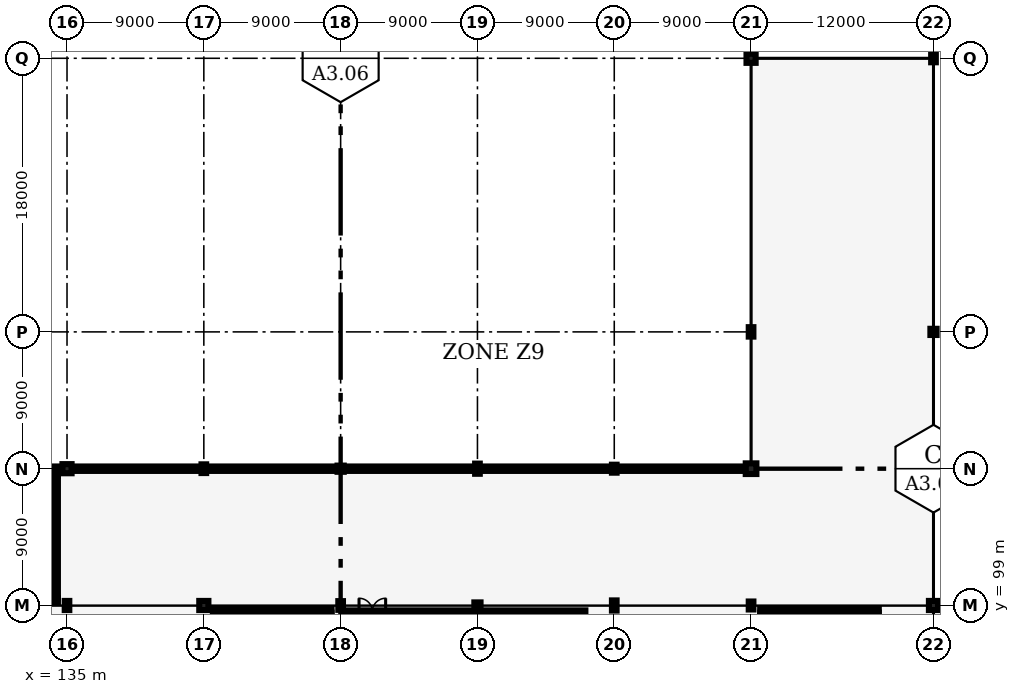
"""IFC4 building model, lengths in metres.
Left out: names, types, materials, properties, quantities, classifications, styles, units other than length and angle.
Written with IfcOpenShell. Run it as: python <this file> out.ifc"""

import sys

from ifc_helpers import new_model, si_unit, direction, frame, frame_2d, origin, origin_2d, place, context, subcontext, project, spatial, rectangle, hollow_circle, i_section, extrude, element, fill, save


model = new_model("IFC4")
c1 = context("Model", 3, precision=1e-05, world=origin(), true_north=direction((0.0, 1.0)))
c2 = subcontext(c1, "Body", "Model", "MODEL_VIEW")
j1 = project(units=[si_unit("LENGTHUNIT", "METRE"), si_unit("PLANEANGLEUNIT", "RADIAN")], contexts=[c1])
p1 = place(None, origin())
s1 = spatial("IfcSite", under=j1, at=p1, CompositionType="ELEMENT")
p2 = place(p1, origin())
s2 = spatial("IfcBuilding", under=s1, at=p2, CompositionType="ELEMENT")
p3 = place(p2, frame((0.0, 0.0, 6.0)))
s3 = spatial("IfcBuildingStorey", under=s2, at=p3, CompositionType="ELEMENT", Elevation=6.0)
p4 = place(p3, frame((135.0, 99.0, 0.0), z_axis=(0.0, 0.0, 1.0), x_axis=(1.0, 0.0, 0.0)))
e1 = element("IfcColumn", 1, at=p4, inside=s3, PredefinedType="COLUMN", context=c2, shape_type="SweptSolid", body=[
    extrude(i_section(OverallWidth=0.3, OverallDepth=0.6, WebThickness=0.015, FlangeThickness=0.03, FilletRadius=0.027, at=origin_2d()), origin(), (0.0, 0.0, 1.0), 6.0),
])
for number, where, z_axis, x_axis in (
    (2, (135.0, 108.0, 0.0), (0.0, 0.0, 1.0), (1.0, 0.0, 0.0)),
    (3, (144.0, 99.0, 0.0), (0.0, 0.0, 1.0), (1.0, 0.0, 0.0)),
):
    element("IfcColumn", number, at=place(p3, frame(where, z_axis=z_axis, x_axis=x_axis)), inside=s3, PredefinedType="COLUMN", context=c2, shape_type="SweptSolid", body=[
        extrude(rectangle(XDim=0.6, YDim=0.6, at=origin_2d()), origin(), (0.0, 0.0, 1.0), 6.0),
    ])
for number, where, z_axis, x_axis in (
    (4, (144.0, 108.0, 0.0), (0.0, 0.0, 1.0), (1.0, 0.0, 0.0)),
    (5, (153.0, 99.0, 0.0), (0.0, 0.0, 1.0), (1.0, 0.0, 0.0)),
):
    element("IfcColumn", number, at=place(p3, frame(where, z_axis=z_axis, x_axis=x_axis)), inside=s3, PredefinedType="COLUMN", context=c2, shape_type="SweptSolid", body=[
        extrude(i_section(OverallWidth=0.306, OverallDepth=0.572, WebThickness=0.021, FlangeThickness=0.04, FilletRadius=0.027, at=origin_2d()), origin(), (0.0, 0.0, 1.0), 6.0),
    ])
for number, where, z_axis, x_axis in (
    (6, (153.0, 108.0, 0.0), (0.0, 0.0, 1.0), (1.0, 0.0, 0.0)),
    (7, (162.0, 99.0, 0.0), (0.0, 0.0, 1.0), (1.0, 0.0, 0.0)),
):
    element("IfcColumn", number, at=place(p3, frame(where, z_axis=z_axis, x_axis=x_axis)), inside=s3, PredefinedType="COLUMN", context=c2, shape_type="SweptSolid", body=[
        extrude(hollow_circle(Radius=0.203, WallThickness=0.016, at=origin_2d()), origin(), (0.0, 0.0, 1.0), 6.0),
    ])
for number, where, z_axis, x_axis in (
    (8, (162.0, 108.0, 0.0), (0.0, 0.0, 1.0), (1.0, 0.0, 0.0)),
    (9, (171.0, 99.0, 0.0), (0.0, 0.0, 1.0), (1.0, 0.0, 0.0)),
):
    element("IfcColumn", number, at=place(p3, frame(where, z_axis=z_axis, x_axis=x_axis)), inside=s3, PredefinedType="COLUMN", context=c2, shape_type="SweptSolid", body=[
        extrude(i_section(OverallWidth=0.305, OverallDepth=0.668, WebThickness=0.021, FlangeThickness=0.04, FilletRadius=0.027, at=origin_2d()), origin(), (0.0, 0.0, 1.0), 6.0),
    ])
for number, where, z_axis, x_axis in (
    (10, (171.0, 108.0, 0.0), (0.0, 0.0, 1.0), (1.0, 0.0, 0.0)),
    (11, (180.0, 99.0, 0.0), (0.0, 0.0, 1.0), (1.0, 0.0, 0.0)),
):
    element("IfcColumn", number, at=place(p3, frame(where, z_axis=z_axis, x_axis=x_axis)), inside=s3, PredefinedType="COLUMN", context=c2, shape_type="SweptSolid", body=[
        extrude(i_section(OverallWidth=0.306, OverallDepth=0.524, WebThickness=0.021, FlangeThickness=0.04, FilletRadius=0.027, at=origin_2d()), origin(), (0.0, 0.0, 1.0), 6.0),
    ])
p5 = place(p3, frame((180.0, 108.0, 0.0), z_axis=(0.0, 0.0, 1.0), x_axis=(1.0, 0.0, 0.0)))
e12 = element("IfcColumn", 12, at=p5, inside=s3, PredefinedType="COLUMN", context=c2, shape_type="SweptSolid", body=[
    extrude(rectangle(XDim=0.7, YDim=0.7, at=origin_2d()), origin(), (0.0, 0.0, 1.0), 6.0),
])
p6 = place(p3, frame((180.0, 117.0, 0.0), z_axis=(0.0, 0.0, 1.0), x_axis=(1.0, 0.0, 0.0)))
e13 = element("IfcColumn", 13, at=p6, inside=s3, PredefinedType="COLUMN", context=c2, shape_type="SweptSolid", body=[
    extrude(i_section(OverallWidth=0.305, OverallDepth=0.62, WebThickness=0.021, FlangeThickness=0.04, FilletRadius=0.027, at=origin_2d()), origin(), (0.0, 0.0, 1.0), 6.0),
])
for number, where, z_axis, x_axis in (
    (14, (180.0, 135.0, 0.0), (0.0, 0.0, 1.0), (1.0, 0.0, 0.0)),
    (15, (192.0, 99.0, 0.0), (0.0, 0.0, 1.0), (1.0, 0.0, 0.0)),
):
    element("IfcColumn", number, at=place(p3, frame(where, z_axis=z_axis, x_axis=x_axis)), inside=s3, PredefinedType="COLUMN", context=c2, shape_type="SweptSolid", body=[
        extrude(rectangle(XDim=0.6, YDim=0.6, at=origin_2d()), origin(), (0.0, 0.0, 1.0), 6.0),
    ])
p7 = place(p3, frame((192.0, 108.0, 0.0), z_axis=(0.0, 0.0, 1.0), x_axis=(1.0, 0.0, 0.0)))
e16 = element("IfcColumn", 16, at=p7, inside=s3, PredefinedType="COLUMN", context=c2, shape_type="SweptSolid", body=[
    extrude(i_section(OverallWidth=0.306, OverallDepth=0.572, WebThickness=0.021, FlangeThickness=0.04, FilletRadius=0.027, at=origin_2d()), origin(), (0.0, 0.0, 1.0), 6.0),
])
p8 = place(p3, frame((192.0, 117.0, 0.0), z_axis=(0.0, 0.0, 1.0), x_axis=(1.0, 0.0, 0.0)))
e17 = element("IfcColumn", 17, at=p8, inside=s3, PredefinedType="COLUMN", context=c2, shape_type="SweptSolid", body=[
    extrude(hollow_circle(Radius=0.203, WallThickness=0.016, at=origin_2d()), origin(), (0.0, 0.0, 1.0), 6.0),
])
p9 = place(p3, frame((192.0, 135.0, 0.0), z_axis=(0.0, 0.0, 1.0), x_axis=(1.0, 0.0, 0.0)))
e18 = element("IfcColumn", 18, at=p9, inside=s3, PredefinedType="COLUMN", context=c2, shape_type="SweptSolid", body=[
    extrude(i_section(OverallWidth=0.306, OverallDepth=0.524, WebThickness=0.021, FlangeThickness=0.04, FilletRadius=0.027, at=origin_2d()), origin(), (0.0, 0.0, 1.0), 6.0),
])
p10 = place(p3, frame((126.145, 108.0, 0.0), z_axis=(0.0, 0.0, 1.0), x_axis=(1.0, 0.0, 0.0)))
e19 = element("IfcWall", 19, at=p10, inside=s3, PredefinedType="SOLIDWALL", context=c2, shape_type="SweptSolid", body=[
    extrude(rectangle(XDim=8.56, YDim=0.29, at=frame_2d((4.28, 0.0))), origin(), (0.0, 0.0, 1.0), 4.9),
])
p11 = place(p10, frame((2.655, 0.0, 0.9)))
e20 = element("IfcOpeningElement", 20, at=p11, cuts=e19, PredefinedType="OPENING", context=c2, shape_type="SweptSolid", body=[
    extrude(rectangle(XDim=1.75, YDim=1.45, at=frame_2d((0.875, 0.725))), frame((0.0, 0.155, 0.0), z_axis=(0.0, -1.0, 0.0), x_axis=(1.0, 0.0, 0.0)), (0.0, 0.0, 1.0), 0.31),
])
p12 = place(p3, frame((135.295, 108.0, 0.0), z_axis=(0.0, 0.0, 1.0), x_axis=(1.0, 0.0, 0.0)))
e21 = element("IfcWall", 21, at=p12, inside=s3, PredefinedType="SOLIDWALL", context=c2, shape_type="SweptSolid", body=[
    extrude(rectangle(XDim=8.557, YDim=0.29, at=frame_2d((4.279, 0.0))), origin(), (0.0, 0.0, 1.0), 4.9),
])
p13 = place(p12, frame((2.505, 0.0, 0.9)))
e22 = element("IfcOpeningElement", 22, at=p13, cuts=e21, PredefinedType="OPENING", context=c2, shape_type="SweptSolid", body=[
    extrude(rectangle(XDim=1.55, YDim=1.4, at=frame_2d((0.775, 0.7))), frame((0.0, 0.155, 0.0), z_axis=(0.0, -1.0, 0.0), x_axis=(1.0, 0.0, 0.0)), (0.0, 0.0, 1.0), 0.31),
])
p14 = place(p3, frame((144.148, 108.0, 0.0), z_axis=(0.0, 0.0, 1.0), x_axis=(1.0, 0.0, 0.0)))
e23 = element("IfcWall", 23, at=p14, inside=s3, PredefinedType="SOLIDWALL", context=c2, shape_type="SweptSolid", body=[
    extrude(rectangle(XDim=8.654, YDim=0.29, at=frame_2d((4.327, 0.0))), origin(), (0.0, 0.0, 1.0), 4.9),
])
p15 = place(p14, frame((2.652, 0.0, 0.9)))
e24 = element("IfcOpeningElement", 24, at=p15, cuts=e23, PredefinedType="OPENING", context=c2, shape_type="SweptSolid", body=[
    extrude(rectangle(XDim=2.25, YDim=1.35, at=frame_2d((1.125, 0.675))), frame((0.0, 0.155, 0.0), z_axis=(0.0, -1.0, 0.0), x_axis=(1.0, 0.0, 0.0)), (0.0, 0.0, 1.0), 0.31),
])
p16 = place(p3, frame((153.198, 108.0, 0.0), z_axis=(0.0, 0.0, 1.0), x_axis=(1.0, 0.0, 0.0)))
e25 = element("IfcWall", 25, at=p16, inside=s3, PredefinedType="SOLIDWALL", context=c2, shape_type="SweptSolid", body=[
    extrude(rectangle(XDim=8.654, YDim=0.29, at=frame_2d((4.327, 0.0))), origin(), (0.0, 0.0, 1.0), 4.9),
])
p17 = place(p16, frame((2.602, 0.0, 0.9)))
e26 = element("IfcOpeningElement", 26, at=p17, cuts=e25, PredefinedType="OPENING", context=c2, shape_type="SweptSolid", body=[
    extrude(rectangle(XDim=1.85, YDim=1.3, at=frame_2d((0.925, 0.65))), frame((0.0, 0.155, 0.0), z_axis=(0.0, -1.0, 0.0), x_axis=(1.0, 0.0, 0.0)), (0.0, 0.0, 1.0), 0.31),
])
p18 = place(p3, frame((162.147, 108.0, 0.0), z_axis=(0.0, 0.0, 1.0), x_axis=(1.0, 0.0, 0.0)))
e27 = element("IfcWall", 27, at=p18, inside=s3, PredefinedType="SOLIDWALL", context=c2, shape_type="SweptSolid", body=[
    extrude(rectangle(XDim=8.705, YDim=0.29, at=frame_2d((4.352, 0.0))), origin(), (0.0, 0.0, 1.0), 4.9),
])
p19 = place(p18, frame((2.653, 0.0, 0.9)))
e28 = element("IfcOpeningElement", 28, at=p19, cuts=e27, PredefinedType="OPENING", context=c2, shape_type="SweptSolid", body=[
    extrude(rectangle(XDim=1.45, YDim=1.25, at=frame_2d((0.725, 0.625))), frame((0.0, 0.155, 0.0), z_axis=(0.0, -1.0, 0.0), x_axis=(1.0, 0.0, 0.0)), (0.0, 0.0, 1.0), 0.31),
])
p20 = place(p3, frame((171.148, 108.0, 0.0), z_axis=(0.0, 0.0, 1.0), x_axis=(1.0, 0.0, 0.0)))
e29 = element("IfcWall", 29, at=p20, inside=s3, PredefinedType="SOLIDWALL", context=c2, shape_type="SweptSolid", body=[
    extrude(rectangle(XDim=8.507, YDim=0.29, at=frame_2d((4.253, 0.0))), origin(), (0.0, 0.0, 1.0), 4.9),
])
p21 = place(p20, frame((2.652, 0.0, 0.9)))
e30 = element("IfcOpeningElement", 30, at=p21, cuts=e29, PredefinedType="OPENING", context=c2, shape_type="SweptSolid", body=[
    extrude(rectangle(XDim=2.4, YDim=1.6, at=frame_2d((1.2, 0.8))), frame((0.0, 0.155, 0.0), z_axis=(0.0, -1.0, 0.0), x_axis=(1.0, 0.0, 0.0)), (0.0, 0.0, 1.0), 0.31),
])
p22 = place(p3, frame((180.725, 90.47, 0.0), z_axis=(0.0, 0.0, 1.0), x_axis=(0.0, 1.0, 0.0)))
e31 = element("IfcWall", 31, at=p22, inside=s3, PredefinedType="SHEAR", context=c2, shape_type="SweptSolid", body=[
    extrude(rectangle(XDim=8.06, YDim=0.25, at=frame_2d((4.03, 0.0))), origin(), (0.0, 0.0, 1.0), 5.64),
])
p23 = place(p22, frame((1.15, 0.0, 0.0)))
e32 = element("IfcOpeningElement", 32, at=p23, cuts=e31, PredefinedType="OPENING", context=c2, shape_type="SweptSolid", body=[
    extrude(rectangle(XDim=1.6, YDim=2.2, at=frame_2d((0.8, 1.1))), frame((0.0, 0.135, 0.0), z_axis=(0.0, -1.0, 0.0), x_axis=(1.0, 0.0, 0.0)), (0.0, 0.0, 1.0), 0.27),
])
p24 = place(p3, frame((188.275, 90.47, 0.0), z_axis=(0.0, 0.0, 1.0), x_axis=(0.0, 1.0, 0.0)))
e33 = element("IfcWall", 33, at=p24, inside=s3, PredefinedType="SHEAR", context=c2, shape_type="SweptSolid", body=[
    extrude(rectangle(XDim=8.06, YDim=0.25, at=frame_2d((4.03, 0.0))), origin(), (0.0, 0.0, 1.0), 5.64),
])
p25 = place(p3, frame((180.6, 98.655, 0.0), z_axis=(0.0, 0.0, 1.0), x_axis=(1.0, 0.0, 0.0)))
e34 = element("IfcWall", 34, at=p25, inside=s3, PredefinedType="SHEAR", context=c2, shape_type="SweptSolid", body=[
    extrude(rectangle(XDim=7.8, YDim=0.25, at=frame_2d((3.9, 0.0))), origin(), (0.0, 0.0, 1.0), 5.64),
])
p26 = place(p3, frame((184.585, 90.47, 0.0), z_axis=(0.0, 0.0, 1.0), x_axis=(0.0, 1.0, 0.0)))
e35 = element("IfcWall", 35, at=p26, inside=s3, PredefinedType="SHEAR", context=c2, shape_type="SweptSolid", body=[
    extrude(rectangle(XDim=8.06, YDim=0.25, at=frame_2d((4.03, 0.0))), origin(), (0.0, 0.0, 1.0), 5.64),
])
p27 = place(p26, frame((0.25, 0.0, 0.0)))
e36 = element("IfcOpeningElement", 36, at=p27, cuts=e35, PredefinedType="OPENING", context=c2, shape_type="SweptSolid", body=[
    extrude(rectangle(XDim=1.15, YDim=2.15, at=frame_2d((0.575, 1.075))), frame((0.0, 0.135, 0.0), z_axis=(0.0, -1.0, 0.0), x_axis=(1.0, 0.0, 0.0)), (0.0, 0.0, 1.0), 0.27),
])
p28 = place(p3, frame((144.725, 90.47, 0.0), z_axis=(0.0, 0.0, 1.0), x_axis=(0.0, 1.0, 0.0)))
e37 = element("IfcWall", 37, at=p28, inside=s3, PredefinedType="SHEAR", context=c2, shape_type="SweptSolid", body=[
    extrude(rectangle(XDim=8.06, YDim=0.25, at=frame_2d((4.03, 0.0))), origin(), (0.0, 0.0, 1.0), 5.64),
])
p29 = place(p3, frame((152.275, 90.47, 0.0), z_axis=(0.0, 0.0, 1.0), x_axis=(0.0, 1.0, 0.0)))
e38 = element("IfcWall", 38, at=p29, inside=s3, PredefinedType="SHEAR", context=c2, shape_type="SweptSolid", body=[
    extrude(rectangle(XDim=8.06, YDim=0.25, at=frame_2d((4.03, 0.0))), origin(), (0.0, 0.0, 1.0), 5.64),
])
p30 = place(p29, frame((1.15, 0.0, 0.0)))
e39 = element("IfcOpeningElement", 39, at=p30, cuts=e38, PredefinedType="OPENING", context=c2, shape_type="SweptSolid", body=[
    extrude(rectangle(XDim=1.8, YDim=2.2, at=frame_2d((0.9, 1.1))), frame((0.0, 0.135, 0.0), z_axis=(0.0, -1.0, 0.0), x_axis=(1.0, 0.0, 0.0)), (0.0, 0.0, 1.0), 0.27),
])
p31 = place(p3, frame((144.6, 98.655, 0.0), z_axis=(0.0, 0.0, 1.0), x_axis=(1.0, 0.0, 0.0)))
e40 = element("IfcWall", 40, at=p31, inside=s3, PredefinedType="SHEAR", context=c2, shape_type="SweptSolid", body=[
    extrude(rectangle(XDim=7.8, YDim=0.25, at=frame_2d((3.9, 0.0))), origin(), (0.0, 0.0, 1.0), 5.64),
])
p32 = place(p3, frame((148.415, 90.47, 0.0), z_axis=(0.0, 0.0, 1.0), x_axis=(0.0, 1.0, 0.0)))
e41 = element("IfcWall", 41, at=p32, inside=s3, PredefinedType="SHEAR", context=c2, shape_type="SweptSolid", body=[
    extrude(rectangle(XDim=8.06, YDim=0.25, at=frame_2d((4.03, 0.0))), origin(), (0.0, 0.0, 1.0), 5.64),
])
p33 = place(p32, frame((0.25, 0.0, 0.0)))
e42 = element("IfcOpeningElement", 42, at=p33, cuts=e41, PredefinedType="OPENING", context=c2, shape_type="SweptSolid", body=[
    extrude(rectangle(XDim=1.15, YDim=2.15, at=frame_2d((0.575, 1.075))), frame((0.0, 0.135, 0.0), z_axis=(0.0, -1.0, 0.0), x_axis=(1.0, 0.0, 0.0)), (0.0, 0.0, 1.0), 0.27),
])
p34 = place(p3, frame((134.275, 99.47, 0.0), z_axis=(0.0, 0.0, 1.0), x_axis=(0.0, 1.0, 0.0)))
e43 = element("IfcWall", 43, at=p34, inside=s3, PredefinedType="SHEAR", context=c2, shape_type="SweptSolid", body=[
    extrude(rectangle(XDim=8.06, YDim=0.25, at=frame_2d((4.03, 0.0))), origin(), (0.0, 0.0, 1.0), 5.64),
])
p35 = place(p34, frame((1.15, 0.0, 0.0)))
e44 = element("IfcOpeningElement", 44, at=p35, cuts=e43, PredefinedType="OPENING", context=c2, shape_type="SweptSolid", body=[
    extrude(rectangle(XDim=1.6, YDim=2.2, at=frame_2d((0.8, 1.1))), frame((0.0, 0.135, 0.0), z_axis=(0.0, -1.0, 0.0), x_axis=(1.0, 0.0, 0.0)), (0.0, 0.0, 1.0), 0.27),
])
for number, where, z_axis, x_axis in (
    (45, (126.6, 99.345, 0.0), (0.0, 0.0, 1.0), (1.0, 0.0, 0.0)),
    (46, (126.6, 107.655, 0.0), (0.0, 0.0, 1.0), (1.0, 0.0, 0.0)),
):
    element("IfcWall", number, at=place(p3, frame(where, z_axis=z_axis, x_axis=x_axis)), inside=s3, PredefinedType="SHEAR", context=c2, shape_type="SweptSolid", body=[
        extrude(rectangle(XDim=7.8, YDim=0.25, at=frame_2d((3.9, 0.0))), origin(), (0.0, 0.0, 1.0), 5.64),
    ])
p36 = place(p3, frame((130.5, 104.37, 0.0), z_axis=(0.0, 0.0, 1.0), x_axis=(1.0, 0.0, 0.0)))
e47 = element("IfcWall", 47, at=p36, inside=s3, PredefinedType="SHEAR", context=c2, shape_type="SweptSolid", body=[
    extrude(rectangle(XDim=3.65, YDim=0.25, at=frame_2d((1.825, 0.0))), origin(), (0.0, 0.0, 1.0), 5.64),
])
p37 = place(p36, frame((0.5, 0.0, 0.0)))
e48 = element("IfcOpeningElement", 48, at=p37, cuts=e47, PredefinedType="OPENING", context=c2, shape_type="SweptSolid", body=[
    extrude(rectangle(XDim=2.2, YDim=2.4, at=frame_2d((1.1, 1.2))), frame((0.0, 0.135, 0.0), z_axis=(0.0, -1.0, 0.0), x_axis=(1.0, 0.0, 0.0)), (0.0, 0.0, 1.0), 0.27),
])
p38 = place(p3, frame((153.06, 98.6, 0.0), z_axis=(0.0, 0.0, 1.0), x_axis=(1.0, 0.0, 0.0)))
e49 = element("IfcWall", 49, at=p38, inside=s3, PredefinedType="PARTITIONING", context=c2, shape_type="SweptSolid", body=[
    extrude(rectangle(XDim=16.04, YDim=0.155, at=frame_2d((8.02, 0.0))), origin(), (0.0, 0.0, 1.0), 4.85),
])
p39 = place(p38, frame((1.15, 0.0, 0.0)))
e50 = element("IfcOpeningElement", 50, at=p39, cuts=e49, PredefinedType="OPENING", context=c2, shape_type="SweptSolid", body=[
    extrude(rectangle(XDim=1.75, YDim=2.3, at=frame_2d((0.875, 1.15))), frame((0.0, 0.087, 0.0), z_axis=(0.0, -1.0, 0.0), x_axis=(1.0, 0.0, 0.0)), (0.0, 0.0, 1.0), 0.175),
])
p40 = place(p13, origin())
e51 = element("IfcWindow", 51, at=p40, inside=s3, PartitioningType="SINGLE_PANEL", PredefinedType="WINDOW", context=c2, shape_type="SweptSolid", body=[
    extrude(rectangle(XDim=1.55, YDim=1.4, at=frame_2d((0.775, 0.7))), frame((0.0, 0.03, 0.0), z_axis=(0.0, -1.0, 0.0), x_axis=(1.0, 0.0, 0.0)), (0.0, 0.0, 1.0), 0.06),
])
fill(e22, e51)
p41 = place(p15, origin())
e52 = element("IfcWindow", 52, at=p41, inside=s3, PartitioningType="SINGLE_PANEL", PredefinedType="WINDOW", context=c2, shape_type="SweptSolid", body=[
    extrude(rectangle(XDim=2.25, YDim=1.35, at=frame_2d((1.125, 0.675))), frame((0.0, 0.03, 0.0), z_axis=(0.0, -1.0, 0.0), x_axis=(1.0, 0.0, 0.0)), (0.0, 0.0, 1.0), 0.06),
])
fill(e24, e52)
p42 = place(p17, origin())
e53 = element("IfcWindow", 53, at=p42, inside=s3, PartitioningType="SINGLE_PANEL", PredefinedType="WINDOW", context=c2, shape_type="SweptSolid", body=[
    extrude(rectangle(XDim=1.85, YDim=1.3, at=frame_2d((0.925, 0.65))), frame((0.0, 0.03, 0.0), z_axis=(0.0, -1.0, 0.0), x_axis=(1.0, 0.0, 0.0)), (0.0, 0.0, 1.0), 0.06),
])
fill(e26, e53)
p43 = place(p19, origin())
e54 = element("IfcWindow", 54, at=p43, inside=s3, PartitioningType="SINGLE_PANEL", PredefinedType="WINDOW", context=c2, shape_type="SweptSolid", body=[
    extrude(rectangle(XDim=1.45, YDim=1.25, at=frame_2d((0.725, 0.625))), frame((0.0, 0.03, 0.0), z_axis=(0.0, -1.0, 0.0), x_axis=(1.0, 0.0, 0.0)), (0.0, 0.0, 1.0), 0.06),
])
fill(e28, e54)
p44 = place(p21, origin())
e55 = element("IfcWindow", 55, at=p44, inside=s3, PartitioningType="SINGLE_PANEL", PredefinedType="WINDOW", context=c2, shape_type="SweptSolid", body=[
    extrude(rectangle(XDim=2.4, YDim=1.6, at=frame_2d((1.2, 0.8))), frame((0.0, 0.03, 0.0), z_axis=(0.0, -1.0, 0.0), x_axis=(1.0, 0.0, 0.0)), (0.0, 0.0, 1.0), 0.06),
])
fill(e30, e55)
p45 = place(p35, origin())
e56 = element("IfcDoor", 56, at=p45, inside=s3, OperationType="DOUBLE_DOOR_SINGLE_SWING", PredefinedType="DOOR", context=c2, shape_type="SweptSolid", body=[
    extrude(rectangle(XDim=1.6, YDim=2.2, at=frame_2d((0.8, 1.1))), frame((0.0, 0.025, 0.0), z_axis=(0.0, -1.0, 0.0), x_axis=(1.0, 0.0, 0.0)), (0.0, 0.0, 1.0), 0.05),
])
fill(e44, e56)
p46 = place(p39, origin())
e57 = element("IfcDoor", 57, at=p46, inside=s3, OperationType="DOUBLE_DOOR_SINGLE_SWING", PredefinedType="DOOR", context=c2, shape_type="SweptSolid", body=[
    extrude(rectangle(XDim=1.75, YDim=2.3, at=frame_2d((0.875, 1.15))), frame((0.0, 0.025, 0.0), z_axis=(0.0, -1.0, 0.0), x_axis=(1.0, 0.0, 0.0)), (0.0, 0.0, 1.0), 0.05),
])
fill(e50, e57)
save(model, sys.argv[1])
